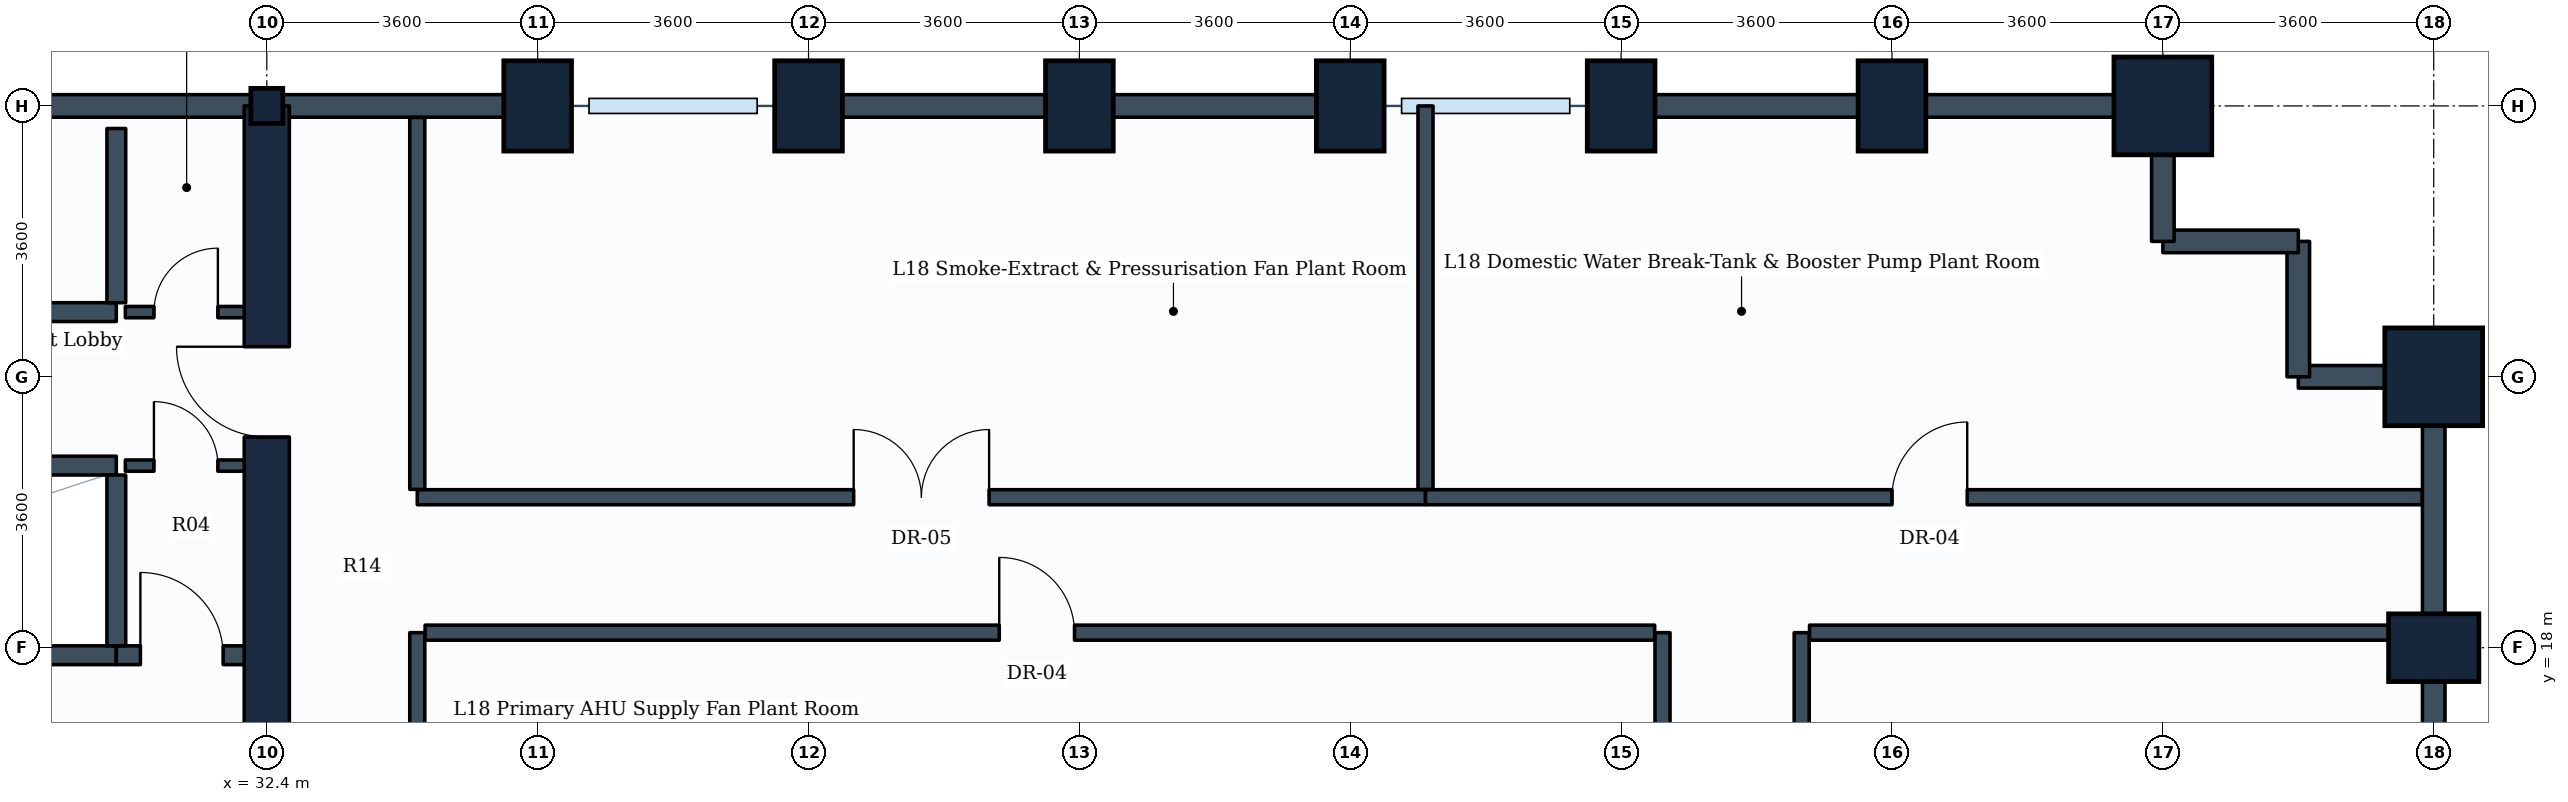
"""IFC4 building model, lengths in metres.
Left out: names, types, materials, properties, quantities, classifications, styles, units other than length and angle.
Written with IfcOpenShell. Run it as: python <this file> out.ifc"""

import sys

from ifc_helpers import new_model, si_unit, direction, frame, frame_2d, origin, origin_2d, place, context, subcontext, project, spatial, rectangle, i_section, extrude, element, fill, save


model = new_model("IFC4")
c1 = context("Model", 3, precision=1e-05, world=origin(), true_north=direction((0.0, 1.0)))
c2 = subcontext(c1, "Body", "Model", "MODEL_VIEW")
j1 = project(units=[si_unit("LENGTHUNIT", "METRE"), si_unit("PLANEANGLEUNIT", "RADIAN")], contexts=[c1])
p1 = place(None, origin())
s1 = spatial("IfcSite", under=j1, at=p1, CompositionType="ELEMENT")
p2 = place(p1, origin())
s2 = spatial("IfcBuilding", under=s1, at=p2, CompositionType="ELEMENT")
p3 = place(p2, frame((0.0, 0.0, 74.7)))
s3 = spatial("IfcBuildingStorey", under=s2, at=p3, CompositionType="ELEMENT", Elevation=74.7)
p4 = place(p3, frame((32.4, 25.2, 0.0), z_axis=(0.0, 0.0, 1.0), x_axis=(1.0, 0.0, 0.0)))
e1 = element("IfcColumn", 1, at=p4, inside=s3, PredefinedType="COLUMN", context=c2, shape_type="SweptSolid", body=[
    extrude(i_section(OverallWidth=0.424, OverallDepth=0.467, WebThickness=0.033, FlangeThickness=0.053, FilletRadius=0.015, at=origin_2d()), origin(), (0.0, 0.0, 1.0), 5.4),
])
for number, where, z_axis, x_axis in (
    (2, (36.0, 25.2, 0.0), (0.0, 0.0, 1.0), (1.0, 0.0, 0.0)),
    (3, (39.6, 25.2, 0.0), (0.0, 0.0, 1.0), (1.0, 0.0, 0.0)),
    (4, (43.2, 25.2, 0.0), (0.0, 0.0, 1.0), (1.0, 0.0, 0.0)),
    (5, (46.8, 25.2, 0.0), (0.0, 0.0, 1.0), (1.0, 0.0, 0.0)),
    (6, (50.4, 25.2, 0.0), (0.0, 0.0, 1.0), (1.0, 0.0, 0.0)),
    (7, (54.0, 25.2, 0.0), (0.0, 0.0, 1.0), (1.0, 0.0, 0.0)),
):
    element("IfcColumn", number, at=place(p3, frame(where, z_axis=z_axis, x_axis=x_axis)), inside=s3, PredefinedType="COLUMN", context=c2, shape_type="SweptSolid", body=[
        extrude(rectangle(XDim=0.9, YDim=1.2, at=origin_2d()), origin(), (0.0, 0.0, 1.0), 5.4),
    ])
p5 = place(p3, frame((57.6, 25.2, 0.0), z_axis=(0.0, 0.0, 1.0), x_axis=(1.0, 0.0, 0.0)))
e8 = element("IfcColumn", 8, at=p5, inside=s3, PredefinedType="COLUMN", context=c2, shape_type="SweptSolid", body=[
    extrude(rectangle(XDim=1.3, YDim=1.3, at=origin_2d()), origin(), (0.0, 0.0, 1.0), 5.4),
])
p6 = place(p3, frame((61.2, 18.0, 0.0), z_axis=(0.0, 0.0, 1.0), x_axis=(0.0, 1.0, 0.0)))
e9 = element("IfcColumn", 9, at=p6, inside=s3, PredefinedType="COLUMN", context=c2, shape_type="SweptSolid", body=[
    extrude(rectangle(XDim=0.9, YDim=1.2, at=origin_2d()), origin(), (0.0, 0.0, 1.0), 5.4),
])
p7 = place(p3, frame((61.2, 21.6, 0.0), z_axis=(0.0, 0.0, 1.0), x_axis=(0.0, 1.0, 0.0)))
e10 = element("IfcColumn", 10, at=p7, inside=s3, PredefinedType="COLUMN", context=c2, shape_type="SweptSolid", body=[
    extrude(rectangle(XDim=1.3, YDim=1.3, at=origin_2d()), origin(), (0.0, 0.0, 1.0), 5.4),
])
p8 = place(p3, frame((61.2, 18.0, 0.0), z_axis=(0.0, 0.0, 1.0), x_axis=(0.0, -1.0, 0.0)))
e11 = element("IfcWall", 11, at=p8, inside=s3, PredefinedType="STANDARD", context=c2, shape_type="SweptSolid", body=[
    extrude(rectangle(XDim=3.6, YDim=0.3, at=frame_2d((1.8, 0.0))), origin(), (0.0, 0.0, 1.0), 3.58),
])
p9 = place(p3, frame((61.2, 21.6, 0.0), z_axis=(0.0, 0.0, 1.0), x_axis=(0.0, -1.0, 0.0)))
e12 = element("IfcWall", 12, at=p9, inside=s3, PredefinedType="STANDARD", context=c2, shape_type="SweptSolid", body=[
    extrude(rectangle(XDim=3.6, YDim=0.3, at=frame_2d((1.8, 0.0))), origin(), (0.0, 0.0, 1.0), 4.03),
])
p10 = place(p3, frame((61.2, 21.6, 0.0), z_axis=(0.0, 0.0, 1.0), x_axis=(-1.0, 0.0, 0.0)))
e13 = element("IfcWall", 13, at=p10, inside=s3, PredefinedType="STANDARD", context=c2, shape_type="SweptSolid", body=[
    extrude(rectangle(XDim=1.8, YDim=0.3, at=frame_2d((0.9, 0.0))), origin(), (0.0, 0.0, 1.0), 4.03),
])
p11 = place(p3, frame((59.4, 23.4, 0.0), z_axis=(0.0, 0.0, 1.0), x_axis=(0.0, -1.0, 0.0)))
e14 = element("IfcWall", 14, at=p11, inside=s3, PredefinedType="STANDARD", context=c2, shape_type="SweptSolid", body=[
    extrude(rectangle(XDim=1.8, YDim=0.3, at=frame_2d((0.9, 0.0))), origin(), (0.0, 0.0, 1.0), 5.065),
])
p12 = place(p3, frame((57.6, 23.4, 0.0), z_axis=(0.0, 0.0, 1.0), x_axis=(1.0, 0.0, 0.0)))
e15 = element("IfcWall", 15, at=p12, inside=s3, PredefinedType="STANDARD", context=c2, shape_type="SweptSolid", body=[
    extrude(rectangle(XDim=1.8, YDim=0.3, at=frame_2d((0.9, 0.0))), origin(), (0.0, 0.0, 1.0), 3.58),
])
p13 = place(p3, frame((57.6, 25.2, 0.0), z_axis=(0.0, 0.0, 1.0), x_axis=(0.0, -1.0, 0.0)))
e16 = element("IfcWall", 16, at=p13, inside=s3, PredefinedType="STANDARD", context=c2, shape_type="SweptSolid", body=[
    extrude(rectangle(XDim=1.8, YDim=0.3, at=frame_2d((0.9, 0.0))), origin(), (0.0, 0.0, 1.0), 3.58),
])
p14 = place(p3, frame((54.0, 25.2, 0.0), z_axis=(0.0, 0.0, 1.0), x_axis=(1.0, 0.0, 0.0)))
e17 = element("IfcWall", 17, at=p14, inside=s3, PredefinedType="STANDARD", context=c2, shape_type="SweptSolid", body=[
    extrude(rectangle(XDim=3.6, YDim=0.3, at=frame_2d((1.8, 0.0))), origin(), (0.0, 0.0, 1.0), 3.58),
])
for number, where, z_axis, x_axis in (
    (18, (50.4, 25.2, 0.0), (0.0, 0.0, 1.0), (1.0, 0.0, 0.0)),
    (19, (43.2, 25.2, 0.0), (0.0, 0.0, 1.0), (1.0, 0.0, 0.0)),
):
    element("IfcWall", number, at=place(p3, frame(where, z_axis=z_axis, x_axis=x_axis)), inside=s3, PredefinedType="STANDARD", context=c2, shape_type="SweptSolid", body=[
        extrude(rectangle(XDim=3.6, YDim=0.3, at=frame_2d((1.8, 0.0))), origin(), (0.0, 0.0, 1.0), 4.43),
    ])
p15 = place(p3, frame((39.6, 25.2, 0.0), z_axis=(0.0, 0.0, 1.0), x_axis=(1.0, 0.0, 0.0)))
e20 = element("IfcWall", 20, at=p15, inside=s3, PredefinedType="STANDARD", context=c2, shape_type="SweptSolid", body=[
    extrude(rectangle(XDim=3.6, YDim=0.3, at=frame_2d((1.8, 0.0))), origin(), (0.0, 0.0, 1.0), 4.43),
])
p16 = place(p3, frame((32.4, 25.2, 0.0), z_axis=(0.0, 0.0, 1.0), x_axis=(1.0, 0.0, 0.0)))
e21 = element("IfcWall", 21, at=p16, inside=s3, PredefinedType="STANDARD", context=c2, shape_type="SweptSolid", body=[
    extrude(rectangle(XDim=3.6, YDim=0.3, at=frame_2d((1.8, 0.0))), origin(), (0.0, 0.0, 1.0), 4.43),
])
p17 = place(p3, frame((28.8, 25.2, 0.0), z_axis=(0.0, 0.0, 1.0), x_axis=(1.0, 0.0, 0.0)))
e22 = element("IfcWall", 22, at=p17, inside=s3, PredefinedType="STANDARD", context=c2, shape_type="SweptSolid", body=[
    extrude(rectangle(XDim=3.6, YDim=0.3, at=frame_2d((1.8, 0.0))), origin(), (0.0, 0.0, 1.0), 5.065),
])
p18 = place(p3, frame((32.4, 10.8, 0.0), z_axis=(0.0, 0.0, 1.0), x_axis=(0.0, 1.0, 0.0)))
e23 = element("IfcWall", 23, at=p18, inside=s3, PredefinedType="SHEAR", context=c2, shape_type="SweptSolid", body=[
    extrude(rectangle(XDim=14.4, YDim=0.6, at=frame_2d((7.2, 0.0))), origin(), (0.0, 0.0, 1.0), 5.08),
])
p19 = place(p18, frame((4.35, 0.0, 0.0)))
e24 = element("IfcOpeningElement", 24, at=p19, cuts=e23, PredefinedType="OPENING", context=c2, shape_type="SweptSolid", body=[
    extrude(rectangle(XDim=1.2, YDim=2.1, at=frame_2d((0.6, 1.05))), frame((0.0, 0.31, 0.0), z_axis=(0.0, -1.0, 0.0), x_axis=(1.0, 0.0, 0.0)), (0.0, 0.0, 1.0), 0.62),
])
p20 = place(p18, frame((10.0, 0.0, 0.0)))
e25 = element("IfcOpeningElement", 25, at=p20, cuts=e23, PredefinedType="OPENING", context=c2, shape_type="SweptSolid", body=[
    extrude(rectangle(XDim=1.2, YDim=2.1, at=frame_2d((0.6, 1.05))), frame((0.0, 0.31, 0.0), z_axis=(0.0, -1.0, 0.0), x_axis=(1.0, 0.0, 0.0)), (0.0, 0.0, 1.0), 0.62),
])
p21 = place(p3, frame((21.88, 17.9, 0.0), z_axis=(0.0, 0.0, 1.0), x_axis=(1.0, 0.0, 0.0)))
e26 = element("IfcWall", 26, at=p21, inside=s3, PredefinedType="PARTITIONING", context=c2, shape_type="SweptSolid", body=[
    extrude(rectangle(XDim=8.52, YDim=0.25, at=frame_2d((4.26, 0.0))), origin(), (0.0, 0.0, 1.0), 5.065),
])
p22 = place(p3, frame((30.4, 17.9, 0.0), z_axis=(0.0, 0.0, 1.0), x_axis=(1.0, 0.0, 0.0)))
e27 = element("IfcWall", 27, at=p22, inside=s3, PredefinedType="PARTITIONING", context=c2, shape_type="SweptSolid", body=[
    extrude(rectangle(XDim=1.75, YDim=0.25, at=frame_2d((0.875, 0.0))), origin(), (0.0, 0.0, 1.0), 5.065),
])
p23 = place(p22, frame((0.32, 0.0, 0.0)))
e28 = element("IfcOpeningElement", 28, at=p23, cuts=e27, PredefinedType="OPENING", context=c2, shape_type="SweptSolid", body=[
    extrude(rectangle(XDim=1.1, YDim=2.1, at=frame_2d((0.55, 1.05))), frame((0.0, 0.135, 0.0), z_axis=(0.0, -1.0, 0.0), x_axis=(1.0, 0.0, 0.0)), (0.0, 0.0, 1.0), 0.27),
])
p24 = place(p3, frame((23.18, 20.42, 0.0), z_axis=(0.0, 0.0, 1.0), x_axis=(1.0, 0.0, 0.0)))
e29 = element("IfcWall", 29, at=p24, inside=s3, PredefinedType="PARTITIONING", context=c2, shape_type="SweptSolid", body=[
    extrude(rectangle(XDim=7.22, YDim=0.25, at=frame_2d((3.61, 0.0))), origin(), (0.0, 0.0, 1.0), 5.065),
])
p25 = place(p3, frame((30.4, 18.025, 0.0), z_axis=(0.0, 0.0, 1.0), x_axis=(0.0, 1.0, 0.0)))
e30 = element("IfcWall", 30, at=p25, inside=s3, PredefinedType="PARTITIONING", context=c2, shape_type="SweptSolid", body=[
    extrude(rectangle(XDim=2.27, YDim=0.25, at=frame_2d((1.135, 0.0))), origin(), (0.0, 0.0, 1.0), 5.065),
])
p26 = place(p3, frame((23.18, 22.46, 0.0), z_axis=(0.0, 0.0, 1.0), x_axis=(1.0, 0.0, 0.0)))
e31 = element("IfcWall", 31, at=p26, inside=s3, PredefinedType="PARTITIONING", context=c2, shape_type="SweptSolid", body=[
    extrude(rectangle(XDim=7.22, YDim=0.25, at=frame_2d((3.61, 0.0))), origin(), (0.0, 0.0, 1.0), 5.065),
])
p27 = place(p3, frame((30.4, 22.585, 0.0), z_axis=(0.0, 0.0, 1.0), x_axis=(0.0, 1.0, 0.0)))
e32 = element("IfcWall", 32, at=p27, inside=s3, PredefinedType="PARTITIONING", context=c2, shape_type="SweptSolid", body=[
    extrude(rectangle(XDim=2.315, YDim=0.25, at=frame_2d((1.157, 0.0))), origin(), (0.0, 0.0, 1.0), 5.065),
])
p28 = place(p3, frame((30.52, 22.46, 0.0), z_axis=(0.0, 0.0, 1.0), x_axis=(1.0, 0.0, 0.0)))
e33 = element("IfcWall", 33, at=p28, inside=s3, PredefinedType="PARTITIONING", context=c2, shape_type="SweptSolid", body=[
    extrude(rectangle(XDim=1.63, YDim=0.15, at=frame_2d((0.815, 0.0))), origin(), (0.0, 0.0, 1.0), 5.065),
])
p29 = place(p28, frame((0.38, 0.0, 0.0)))
e34 = element("IfcOpeningElement", 34, at=p29, cuts=e33, PredefinedType="OPENING", context=c2, shape_type="SweptSolid", body=[
    extrude(rectangle(XDim=0.85, YDim=2.1, at=frame_2d((0.425, 1.05))), frame((0.0, 0.085, 0.0), z_axis=(0.0, -1.0, 0.0), x_axis=(1.0, 0.0, 0.0)), (0.0, 0.0, 1.0), 0.17),
])
p30 = place(p3, frame((30.52, 20.42, 0.0), z_axis=(0.0, 0.0, 1.0), x_axis=(1.0, 0.0, 0.0)))
e35 = element("IfcWall", 35, at=p30, inside=s3, PredefinedType="PARTITIONING", context=c2, shape_type="SweptSolid", body=[
    extrude(rectangle(XDim=1.63, YDim=0.15, at=frame_2d((0.815, 0.0))), origin(), (0.0, 0.0, 1.0), 5.065),
])
p31 = place(p30, frame((0.38, 0.0, 0.0)))
e36 = element("IfcOpeningElement", 36, at=p31, cuts=e35, PredefinedType="OPENING", context=c2, shape_type="SweptSolid", body=[
    extrude(rectangle(XDim=0.85, YDim=2.1, at=frame_2d((0.425, 1.05))), frame((0.0, 0.085, 0.0), z_axis=(0.0, -1.0, 0.0), x_axis=(1.0, 0.0, 0.0)), (0.0, 0.0, 1.0), 0.17),
])
p32 = place(p3, frame((52.8, 3.754, 0.0), z_axis=(0.0, 0.0, 1.0), x_axis=(0.0, 1.0, 0.0)))
e37 = element("IfcWall", 37, at=p32, inside=s3, PredefinedType="PARTITIONING", context=c2, shape_type="SweptSolid", body=[
    extrude(rectangle(XDim=14.446, YDim=0.2, at=frame_2d((7.223, 0.0))), origin(), (0.0, 0.0, 1.0), 3.58),
])
p33 = place(p32, frame((6.206, 0.0, 0.0)))
e38 = element("IfcOpeningElement", 38, at=p33, cuts=e37, PredefinedType="OPENING", context=c2, shape_type="SweptSolid", body=[
    extrude(rectangle(XDim=1.8, YDim=2.2, at=frame_2d((0.9, 1.1))), frame((0.0, 0.11, 0.0), z_axis=(0.0, -1.0, 0.0), x_axis=(1.0, 0.0, 0.0)), (0.0, 0.0, 1.0), 0.22),
])
p34 = place(p3, frame((52.904, 18.2, 0.0), z_axis=(0.0, 0.0, 1.0), x_axis=(1.0, 0.0, 0.0)))
e39 = element("IfcWall", 39, at=p34, inside=s3, PredefinedType="PARTITIONING", context=c2, shape_type="SweptSolid", body=[
    extrude(rectangle(XDim=8.142, YDim=0.2, at=frame_2d((4.071, 0.0))), origin(), (0.0, 0.0, 1.0), 3.58),
])
for number, where, z_axis, x_axis in (
    (40, (34.4, 15.004, 0.0), (0.0, 0.0, 1.0), (0.0, 1.0, 0.0)),
    (41, (50.95, 15.004, 0.0), (0.0, 0.0, 1.0), (0.0, 1.0, 0.0)),
):
    element("IfcWall", number, at=place(p3, frame(where, z_axis=z_axis, x_axis=x_axis)), inside=s3, PredefinedType="PARTITIONING", context=c2, shape_type="SweptSolid", body=[
        extrude(rectangle(XDim=3.196, YDim=0.2, at=frame_2d((1.598, 0.0))), origin(), (0.0, 0.0, 1.0), 3.58),
    ])
p35 = place(p3, frame((34.504, 18.2, 0.0), z_axis=(0.0, 0.0, 1.0), x_axis=(1.0, 0.0, 0.0)))
e42 = element("IfcWall", 42, at=p35, inside=s3, PredefinedType="PARTITIONING", context=c2, shape_type="SweptSolid", body=[
    extrude(rectangle(XDim=16.342, YDim=0.2, at=frame_2d((8.171, 0.0))), origin(), (0.0, 0.0, 1.0), 4.61),
])
p36 = place(p35, frame((7.631, 0.0, 0.0)))
e43 = element("IfcOpeningElement", 43, at=p36, cuts=e42, PredefinedType="OPENING", context=c2, shape_type="SweptSolid", body=[
    extrude(rectangle(XDim=1.0, YDim=2.1, at=frame_2d((0.5, 1.05))), frame((0.0, 0.11, 0.0), z_axis=(0.0, -1.0, 0.0), x_axis=(1.0, 0.0, 0.0)), (0.0, 0.0, 1.0), 0.22),
])
p37 = place(p3, frame((34.4, 20.0, 0.0), z_axis=(0.0, 0.0, 1.0), x_axis=(1.0, 0.0, 0.0)))
e44 = element("IfcWall", 44, at=p37, inside=s3, PredefinedType="PARTITIONING", context=c2, shape_type="SweptSolid", body=[
    extrude(rectangle(XDim=13.4, YDim=0.2, at=frame_2d((6.7, 0.0))), origin(), (0.0, 0.0, 1.0), 4.61),
])
p38 = place(p37, frame((5.8, 0.0, 0.0)))
e45 = element("IfcOpeningElement", 45, at=p38, cuts=e44, PredefinedType="OPENING", context=c2, shape_type="SweptSolid", body=[
    extrude(rectangle(XDim=1.8, YDim=2.2, at=frame_2d((0.9, 1.1))), frame((0.0, 0.11, 0.0), z_axis=(0.0, -1.0, 0.0), x_axis=(1.0, 0.0, 0.0)), (0.0, 0.0, 1.0), 0.22),
])
p39 = place(p3, frame((47.8, 20.0, 0.0), z_axis=(0.0, 0.0, 1.0), x_axis=(1.0, 0.0, 0.0)))
e46 = element("IfcWall", 46, at=p39, inside=s3, PredefinedType="PARTITIONING", context=c2, shape_type="SweptSolid", body=[
    extrude(rectangle(XDim=13.246, YDim=0.2, at=frame_2d((6.623, 0.0))), origin(), (0.0, 0.0, 1.0), 3.58),
])
p40 = place(p39, frame((6.2, 0.0, 0.0)))
e47 = element("IfcOpeningElement", 47, at=p40, cuts=e46, PredefinedType="OPENING", context=c2, shape_type="SweptSolid", body=[
    extrude(rectangle(XDim=1.0, YDim=2.1, at=frame_2d((0.5, 1.05))), frame((0.0, 0.11, 0.0), z_axis=(0.0, -1.0, 0.0), x_axis=(1.0, 0.0, 0.0)), (0.0, 0.0, 1.0), 0.22),
])
p41 = place(p3, frame((34.4, 20.104, 0.0), z_axis=(0.0, 0.0, 1.0), x_axis=(0.0, 1.0, 0.0)))
e48 = element("IfcWall", 48, at=p41, inside=s3, PredefinedType="PARTITIONING", context=c2, shape_type="SweptSolid", body=[
    extrude(rectangle(XDim=4.942, YDim=0.2, at=frame_2d((2.471, 0.0))), origin(), (0.0, 0.0, 1.0), 4.43),
])
p42 = place(p3, frame((47.8, 20.104, 0.0), z_axis=(0.0, 0.0, 1.0), x_axis=(0.0, 1.0, 0.0)))
e49 = element("IfcWall", 49, at=p42, inside=s3, PredefinedType="PARTITIONING", context=c2, shape_type="SweptSolid", body=[
    extrude(rectangle(XDim=5.096, YDim=0.2, at=frame_2d((2.548, 0.0))), origin(), (0.0, 0.0, 1.0), 4.43),
])
p43 = place(p23, origin())
e50 = element("IfcDoor", 50, at=p43, inside=s3, OperationType="SINGLE_SWING_LEFT", PredefinedType="DOOR", context=c2, shape_type="SweptSolid", body=[
    extrude(rectangle(XDim=1.1, YDim=2.1, at=frame_2d((0.55, 1.05))), frame((0.0, 0.025, 0.0), z_axis=(0.0, -1.0, 0.0), x_axis=(1.0, 0.0, 0.0)), (0.0, 0.0, 1.0), 0.05),
])
fill(e28, e50)
p44 = place(p20, origin())
e51 = element("IfcDoor", 51, at=p44, inside=s3, OperationType="SINGLE_SWING_RIGHT", PredefinedType="DOOR", context=c2, shape_type="SweptSolid", body=[
    extrude(rectangle(XDim=1.2, YDim=2.1, at=frame_2d((0.6, 1.05))), frame((0.0, 0.025, 0.0), z_axis=(0.0, -1.0, 0.0), x_axis=(1.0, 0.0, 0.0)), (0.0, 0.0, 1.0), 0.05),
])
fill(e25, e51)
p45 = place(p29, origin())
e52 = element("IfcDoor", 52, at=p45, inside=s3, OperationType="SINGLE_SWING_RIGHT", PredefinedType="DOOR", context=c2, shape_type="SweptSolid", body=[
    extrude(rectangle(XDim=0.85, YDim=2.1, at=frame_2d((0.425, 1.05))), frame((0.0, 0.025, 0.0), z_axis=(0.0, -1.0, 0.0), x_axis=(1.0, 0.0, 0.0)), (0.0, 0.0, 1.0), 0.05),
])
fill(e34, e52)
p46 = place(p31, origin())
e53 = element("IfcDoor", 53, at=p46, inside=s3, OperationType="SINGLE_SWING_LEFT", PredefinedType="DOOR", context=c2, shape_type="SweptSolid", body=[
    extrude(rectangle(XDim=0.85, YDim=2.1, at=frame_2d((0.425, 1.05))), frame((0.0, 0.025, 0.0), z_axis=(0.0, -1.0, 0.0), x_axis=(1.0, 0.0, 0.0)), (0.0, 0.0, 1.0), 0.05),
])
fill(e36, e53)
p47 = place(p36, origin())
e54 = element("IfcDoor", 54, at=p47, inside=s3, OperationType="SINGLE_SWING_LEFT", PredefinedType="DOOR", context=c2, shape_type="SweptSolid", body=[
    extrude(rectangle(XDim=1.0, YDim=2.1, at=frame_2d((0.5, 1.05))), frame((0.0, 0.025, 0.0), z_axis=(0.0, -1.0, 0.0), x_axis=(1.0, 0.0, 0.0)), (0.0, 0.0, 1.0), 0.05),
])
fill(e43, e54)
p48 = place(p38, origin())
e55 = element("IfcDoor", 55, at=p48, inside=s3, OperationType="DOUBLE_DOOR_SINGLE_SWING", PredefinedType="DOOR", context=c2, shape_type="SweptSolid", body=[
    extrude(rectangle(XDim=1.8, YDim=2.2, at=frame_2d((0.9, 1.1))), frame((0.0, 0.025, 0.0), z_axis=(0.0, -1.0, 0.0), x_axis=(1.0, 0.0, 0.0)), (0.0, 0.0, 1.0), 0.05),
])
fill(e45, e55)
p49 = place(p40, origin())
e56 = element("IfcDoor", 56, at=p49, inside=s3, OperationType="SINGLE_SWING_RIGHT", PredefinedType="DOOR", context=c2, shape_type="SweptSolid", body=[
    extrude(rectangle(XDim=1.0, YDim=2.1, at=frame_2d((0.5, 1.05))), frame((0.0, 0.025, 0.0), z_axis=(0.0, -1.0, 0.0), x_axis=(1.0, 0.0, 0.0)), (0.0, 0.0, 1.0), 0.05),
])
fill(e47, e56)
save(model, sys.argv[1])
